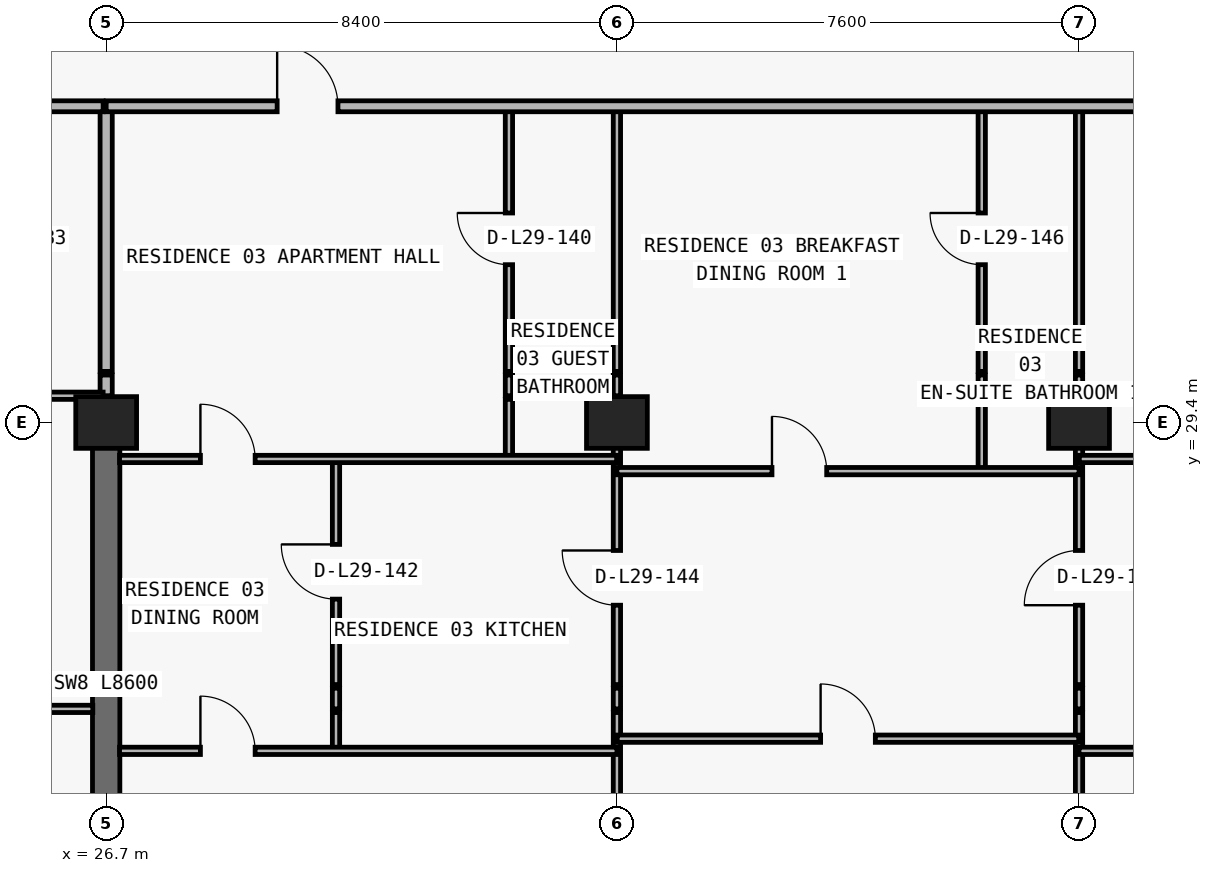
"""IFC4 building model, lengths in metres.
Left out: names, types, materials, properties, quantities, classifications, styles, units other than length and angle.
Written with IfcOpenShell. Run it as: python <this file> out.ifc"""

import sys

from ifc_helpers import new_model, si_unit, direction, frame, frame_2d, origin, origin_2d, place, context, subcontext, project, spatial, rectangle, extrude, element, fill, save


model = new_model("IFC4")
c1 = context("Model", 3, precision=1e-05, world=origin(), true_north=direction((0.0, 1.0)))
c2 = subcontext(c1, "Body", "Model", "MODEL_VIEW")
j1 = project(units=[si_unit("LENGTHUNIT", "METRE"), si_unit("PLANEANGLEUNIT", "RADIAN")], contexts=[c1])
p1 = place(None, origin())
s1 = spatial("IfcSite", under=j1, at=p1, CompositionType="ELEMENT")
p2 = place(p1, origin())
s2 = spatial("IfcBuilding", under=s1, at=p2, CompositionType="ELEMENT")
p3 = place(p2, frame((0.0, 0.0, 109.2)))
s3 = spatial("IfcBuildingStorey", under=s2, at=p3, CompositionType="ELEMENT", Elevation=109.2)
for number, where, z_axis, x_axis in (
    (1, (26.7, 29.4, 0.0), (0.0, 0.0, 1.0), (1.0, 0.0, 0.0)),
    (2, (35.1, 29.4, 0.0), (0.0, 0.0, 1.0), (1.0, 0.0, 0.0)),
    (3, (42.7, 29.4, 0.0), (0.0, 0.0, 1.0), (1.0, 0.0, 0.0)),
):
    element("IfcColumn", number, at=place(p3, frame(where, z_axis=z_axis, x_axis=x_axis)), inside=s3, PredefinedType="COLUMN", context=c2, shape_type="SweptSolid", body=[
        extrude(rectangle(XDim=1.0, YDim=0.85, at=origin_2d()), origin(), (0.0, 0.0, 1.0), 3.05),
    ])
p4 = place(p3, frame((26.7, 20.8, 0.0), z_axis=(0.0, 0.0, 1.0), x_axis=(0.0, 1.0, 0.0)))
e4 = element("IfcWall", 4, at=p4, inside=s3, PredefinedType="SHEAR", context=c2, shape_type="SweptSolid", body=[
    extrude(rectangle(XDim=8.6, YDim=0.45, at=frame_2d((4.3, 0.0))), origin(), (0.0, 0.0, 1.0), 3.05),
])
p5 = place(p3, frame((26.7, 29.405, 0.0), z_axis=(0.0, 0.0, 1.0), x_axis=(0.0, 1.0, 0.0)))
e5 = element("IfcWall", 5, at=p5, inside=s3, PredefinedType="PARTITIONING", context=c2, shape_type="SweptSolid", body=[
    extrude(rectangle(XDim=0.375, YDim=0.2, at=frame_2d((0.188, 0.0))), origin(), (0.0, 0.0, 1.0), 3.05),
])
p6 = place(p3, frame((26.7, 29.84, 0.0), z_axis=(0.0, 0.0, 1.0), x_axis=(0.0, 1.0, 0.0)))
e6 = element("IfcWall", 6, at=p6, inside=s3, PredefinedType="PARTITIONING", context=c2, shape_type="SweptSolid", body=[
    extrude(rectangle(XDim=0.34, YDim=0.2, at=frame_2d((0.17, 0.0))), origin(), (0.0, 0.0, 1.0), 2.335),
])
p7 = place(p3, frame((26.7, 30.24, 0.0), z_axis=(0.0, 0.0, 1.0), x_axis=(0.0, 1.0, 0.0)))
e7 = element("IfcWall", 7, at=p7, inside=s3, PredefinedType="PARTITIONING", context=c2, shape_type="SweptSolid", body=[
    extrude(rectangle(XDim=4.36, YDim=0.2, at=frame_2d((2.18, 0.0))), origin(), (0.0, 0.0, 1.0), 2.335),
])
p8 = place(p3, frame((30.48, 24.0, 0.0), z_axis=(0.0, 0.0, 1.0), x_axis=(0.0, 1.0, 0.0)))
e8 = element("IfcWall", 8, at=p8, inside=s3, PredefinedType="PARTITIONING", context=c2, shape_type="SweptSolid", body=[
    extrude(rectangle(XDim=0.63, YDim=0.12, at=frame_2d((0.315, 0.0))), origin(), (0.0, 0.0, 1.0), 3.05),
])
p9 = place(p3, frame((30.48, 24.69, 0.0), z_axis=(0.0, 0.0, 1.0), x_axis=(0.0, 1.0, 0.0)))
e9 = element("IfcWall", 9, at=p9, inside=s3, PredefinedType="PARTITIONING", context=c2, shape_type="SweptSolid", body=[
    extrude(rectangle(XDim=0.34, YDim=0.12, at=frame_2d((0.17, 0.0))), origin(), (0.0, 0.0, 1.0), 3.05),
])
p10 = place(p3, frame((30.48, 25.09, 0.0), z_axis=(0.0, 0.0, 1.0), x_axis=(0.0, 1.0, 0.0)))
e10 = element("IfcWall", 10, at=p10, inside=s3, PredefinedType="PARTITIONING", context=c2, shape_type="SweptSolid", body=[
    extrude(rectangle(XDim=3.71, YDim=0.12, at=frame_2d((1.855, 0.0))), origin(), (0.0, 0.0, 1.0), 3.05),
])
p11 = place(p10, frame((1.405, 0.0, 0.0)))
e11 = element("IfcOpeningElement", 11, at=p11, cuts=e10, PredefinedType="OPENING", context=c2, shape_type="SweptSolid", body=[
    extrude(rectangle(XDim=0.9, YDim=2.15, at=frame_2d((0.45, 1.075))), frame((0.0, 0.07, 0.0), z_axis=(0.0, -1.0, 0.0), x_axis=(1.0, 0.0, 0.0)), (0.0, 0.0, 1.0), 0.14),
])
p12 = place(p3, frame((33.324, 28.8, 0.0), z_axis=(0.0, 0.0, 1.0), x_axis=(0.0, 1.0, 0.0)))
e12 = element("IfcWall", 12, at=p12, inside=s3, PredefinedType="PARTITIONING", context=c2, shape_type="SweptSolid", body=[
    extrude(rectangle(XDim=0.98, YDim=0.12, at=frame_2d((0.49, 0.0))), origin(), (0.0, 0.0, 1.0), 3.05),
])
p13 = place(p3, frame((33.324, 29.84, 0.0), z_axis=(0.0, 0.0, 1.0), x_axis=(0.0, 1.0, 0.0)))
e13 = element("IfcWall", 13, at=p13, inside=s3, PredefinedType="PARTITIONING", context=c2, shape_type="SweptSolid", body=[
    extrude(rectangle(XDim=0.34, YDim=0.12, at=frame_2d((0.17, 0.0))), origin(), (0.0, 0.0, 1.0), 3.05),
])
p14 = place(p3, frame((33.324, 30.24, 0.0), z_axis=(0.0, 0.0, 1.0), x_axis=(0.0, 1.0, 0.0)))
e14 = element("IfcWall", 14, at=p14, inside=s3, PredefinedType="PARTITIONING", context=c2, shape_type="SweptSolid", body=[
    extrude(rectangle(XDim=4.36, YDim=0.12, at=frame_2d((2.18, 0.0))), origin(), (0.0, 0.0, 1.0), 3.05),
])
p15 = place(p14, frame((1.755, 0.0, 0.0)))
e15 = element("IfcOpeningElement", 15, at=p15, cuts=e14, PredefinedType="OPENING", context=c2, shape_type="SweptSolid", body=[
    extrude(rectangle(XDim=0.85, YDim=2.1, at=frame_2d((0.425, 1.05))), frame((0.0, 0.07, 0.0), z_axis=(0.0, -1.0, 0.0), x_axis=(1.0, 0.0, 0.0)), (0.0, 0.0, 1.0), 0.14),
])
p16 = place(p3, frame((35.1, 8.84, 0.0), z_axis=(0.0, 0.0, 1.0), x_axis=(0.0, 1.0, 0.0)))
e16 = element("IfcWall", 16, at=p16, inside=s3, PredefinedType="PARTITIONING", context=c2, shape_type="SweptSolid", body=[
    extrude(rectangle(XDim=15.79, YDim=0.12, at=frame_2d((7.895, 0.0))), origin(), (0.0, 0.0, 1.0), 2.174),
])
p17 = place(p3, frame((35.1, 24.69, 0.0), z_axis=(0.0, 0.0, 1.0), x_axis=(0.0, 1.0, 0.0)))
e17 = element("IfcWall", 17, at=p17, inside=s3, PredefinedType="PARTITIONING", context=c2, shape_type="SweptSolid", body=[
    extrude(rectangle(XDim=0.34, YDim=0.12, at=frame_2d((0.17, 0.0))), origin(), (0.0, 0.0, 1.0), 2.174),
])
p18 = place(p3, frame((35.1, 25.09, 0.0), z_axis=(0.0, 0.0, 1.0), x_axis=(0.0, 1.0, 0.0)))
e18 = element("IfcWall", 18, at=p18, inside=s3, PredefinedType="PARTITIONING", context=c2, shape_type="SweptSolid", body=[
    extrude(rectangle(XDim=4.69, YDim=0.12, at=frame_2d((2.345, 0.0))), origin(), (0.0, 0.0, 1.0), 2.174),
])
p19 = place(p18, frame((1.305, 0.0, 0.0)))
e19 = element("IfcOpeningElement", 19, at=p19, cuts=e18, PredefinedType="OPENING", context=c2, shape_type="SweptSolid", body=[
    extrude(rectangle(XDim=0.9, YDim=2.124, at=frame_2d((0.45, 1.062))), frame((0.0, 0.07, 0.0), z_axis=(0.0, -1.0, 0.0), x_axis=(1.0, 0.0, 0.0)), (0.0, 0.0, 1.0), 0.14),
])
p20 = place(p3, frame((35.1, 29.84, 0.0), z_axis=(0.0, 0.0, 1.0), x_axis=(0.0, 1.0, 0.0)))
e20 = element("IfcWall", 20, at=p20, inside=s3, PredefinedType="PARTITIONING", context=c2, shape_type="SweptSolid", body=[
    extrude(rectangle(XDim=0.34, YDim=0.12, at=frame_2d((0.17, 0.0))), origin(), (0.0, 0.0, 1.0), 2.174),
])
p21 = place(p3, frame((35.1, 30.24, 0.0), z_axis=(0.0, 0.0, 1.0), x_axis=(0.0, 1.0, 0.0)))
e21 = element("IfcWall", 21, at=p21, inside=s3, PredefinedType="PARTITIONING", context=c2, shape_type="SweptSolid", body=[
    extrude(rectangle(XDim=4.36, YDim=0.12, at=frame_2d((2.18, 0.0))), origin(), (0.0, 0.0, 1.0), 2.174),
])
p22 = place(p3, frame((41.1, 28.6, 0.0), z_axis=(0.0, 0.0, 1.0), x_axis=(0.0, 1.0, 0.0)))
e22 = element("IfcWall", 22, at=p22, inside=s3, PredefinedType="PARTITIONING", context=c2, shape_type="SweptSolid", body=[
    extrude(rectangle(XDim=1.18, YDim=0.12, at=frame_2d((0.59, 0.0))), origin(), (0.0, 0.0, 1.0), 2.679),
])
p23 = place(p3, frame((41.1, 29.84, 0.0), z_axis=(0.0, 0.0, 1.0), x_axis=(0.0, 1.0, 0.0)))
e23 = element("IfcWall", 23, at=p23, inside=s3, PredefinedType="PARTITIONING", context=c2, shape_type="SweptSolid", body=[
    extrude(rectangle(XDim=0.34, YDim=0.12, at=frame_2d((0.17, 0.0))), origin(), (0.0, 0.0, 1.0), 3.05),
])
p24 = place(p3, frame((41.1, 30.24, 0.0), z_axis=(0.0, 0.0, 1.0), x_axis=(0.0, 1.0, 0.0)))
e24 = element("IfcWall", 24, at=p24, inside=s3, PredefinedType="PARTITIONING", context=c2, shape_type="SweptSolid", body=[
    extrude(rectangle(XDim=4.36, YDim=0.12, at=frame_2d((2.18, 0.0))), origin(), (0.0, 0.0, 1.0), 3.05),
])
p25 = place(p24, frame((1.755, 0.0, 0.0)))
e25 = element("IfcOpeningElement", 25, at=p25, cuts=e24, PredefinedType="OPENING", context=c2, shape_type="SweptSolid", body=[
    extrude(rectangle(XDim=0.85, YDim=2.1, at=frame_2d((0.425, 1.05))), frame((0.0, 0.07, 0.0), z_axis=(0.0, -1.0, 0.0), x_axis=(1.0, 0.0, 0.0)), (0.0, 0.0, 1.0), 0.14),
])
p26 = place(p3, frame((42.7, 8.84, 0.0), z_axis=(0.0, 0.0, 1.0), x_axis=(0.0, 1.0, 0.0)))
e26 = element("IfcWall", 26, at=p26, inside=s3, PredefinedType="PARTITIONING", context=c2, shape_type="SweptSolid", body=[
    extrude(rectangle(XDim=15.79, YDim=0.12, at=frame_2d((7.895, 0.0))), origin(), (0.0, 0.0, 1.0), 2.174),
])
p27 = place(p3, frame((42.7, 24.69, 0.0), z_axis=(0.0, 0.0, 1.0), x_axis=(0.0, 1.0, 0.0)))
e27 = element("IfcWall", 27, at=p27, inside=s3, PredefinedType="PARTITIONING", context=c2, shape_type="SweptSolid", body=[
    extrude(rectangle(XDim=0.34, YDim=0.12, at=frame_2d((0.17, 0.0))), origin(), (0.0, 0.0, 1.0), 2.174),
])
p28 = place(p3, frame((42.7, 25.09, 0.0), z_axis=(0.0, 0.0, 1.0), x_axis=(0.0, 1.0, 0.0)))
e28 = element("IfcWall", 28, at=p28, inside=s3, PredefinedType="PARTITIONING", context=c2, shape_type="SweptSolid", body=[
    extrude(rectangle(XDim=4.69, YDim=0.12, at=frame_2d((2.345, 0.0))), origin(), (0.0, 0.0, 1.0), 2.174),
])
p29 = place(p28, frame((1.305, 0.0, 0.0)))
e29 = element("IfcOpeningElement", 29, at=p29, cuts=e28, PredefinedType="OPENING", context=c2, shape_type="SweptSolid", body=[
    extrude(rectangle(XDim=0.9, YDim=2.124, at=frame_2d((0.45, 1.062))), frame((0.0, 0.07, 0.0), z_axis=(0.0, -1.0, 0.0), x_axis=(1.0, 0.0, 0.0)), (0.0, 0.0, 1.0), 0.14),
])
p30 = place(p3, frame((42.7, 29.84, 0.0), z_axis=(0.0, 0.0, 1.0), x_axis=(0.0, 1.0, 0.0)))
e30 = element("IfcWall", 30, at=p30, inside=s3, PredefinedType="PARTITIONING", context=c2, shape_type="SweptSolid", body=[
    extrude(rectangle(XDim=0.34, YDim=0.12, at=frame_2d((0.17, 0.0))), origin(), (0.0, 0.0, 1.0), 2.174),
])
p31 = place(p3, frame((42.7, 30.24, 0.0), z_axis=(0.0, 0.0, 1.0), x_axis=(0.0, 1.0, 0.0)))
e31 = element("IfcWall", 31, at=p31, inside=s3, PredefinedType="PARTITIONING", context=c2, shape_type="SweptSolid", body=[
    extrude(rectangle(XDim=4.36, YDim=0.12, at=frame_2d((2.18, 0.0))), origin(), (0.0, 0.0, 1.0), 2.174),
])
p32 = place(p3, frame((26.92, 24.0, 0.0), z_axis=(0.0, 0.0, 1.0), x_axis=(1.0, 0.0, 0.0)))
e32 = element("IfcWall", 32, at=p32, inside=s3, PredefinedType="PARTITIONING", context=c2, shape_type="SweptSolid", body=[
    extrude(rectangle(XDim=8.18, YDim=0.12, at=frame_2d((4.09, 0.0))), origin(), (0.0, 0.0, 1.0), 3.05),
])
p33 = place(p32, frame((1.33, 0.0, 0.0)))
e33 = element("IfcOpeningElement", 33, at=p33, cuts=e32, PredefinedType="OPENING", context=c2, shape_type="SweptSolid", body=[
    extrude(rectangle(XDim=0.9, YDim=2.15, at=frame_2d((0.45, 1.075))), frame((0.0, 0.07, 0.0), z_axis=(0.0, -1.0, 0.0), x_axis=(1.0, 0.0, 0.0)), (0.0, 0.0, 1.0), 0.14),
])
p34 = place(p3, frame((42.7, 24.0, 0.0), z_axis=(0.0, 0.0, 1.0), x_axis=(1.0, 0.0, 0.0)))
e34 = element("IfcWall", 34, at=p34, inside=s3, PredefinedType="PARTITIONING", context=c2, shape_type="SweptSolid", body=[
    extrude(rectangle(XDim=8.18, YDim=0.12, at=frame_2d((4.09, 0.0))), origin(), (0.0, 0.0, 1.0), 3.05),
])
p35 = place(p34, frame((3.64, 0.0, 0.0)))
e35 = element("IfcOpeningElement", 35, at=p35, cuts=e34, PredefinedType="OPENING", context=c2, shape_type="SweptSolid", body=[
    extrude(rectangle(XDim=0.9, YDim=2.15, at=frame_2d((0.45, 1.075))), frame((0.0, 0.07, 0.0), z_axis=(0.0, -1.0, 0.0), x_axis=(1.0, 0.0, 0.0)), (0.0, 0.0, 1.0), 0.14),
])
p36 = place(p3, frame((35.105, 24.2, 0.0), z_axis=(0.0, 0.0, 1.0), x_axis=(1.0, 0.0, 0.0)))
e36 = element("IfcWall", 36, at=p36, inside=s3, PredefinedType="PARTITIONING", context=c2, shape_type="SweptSolid", body=[
    extrude(rectangle(XDim=7.59, YDim=0.12, at=frame_2d((3.795, 0.0))), origin(), (0.0, 0.0, 1.0), 3.05),
])
p37 = place(p36, frame((3.345, 0.0, 0.0)))
e37 = element("IfcOpeningElement", 37, at=p37, cuts=e36, PredefinedType="OPENING", context=c2, shape_type="SweptSolid", body=[
    extrude(rectangle(XDim=0.9, YDim=2.15, at=frame_2d((0.45, 1.075))), frame((0.0, 0.07, 0.0), z_axis=(0.0, -1.0, 0.0), x_axis=(1.0, 0.0, 0.0)), (0.0, 0.0, 1.0), 0.14),
])
p38 = place(p3, frame((18.3, 24.69, 0.0), z_axis=(0.0, 0.0, 1.0), x_axis=(1.0, 0.0, 0.0)))
e38 = element("IfcWall", 38, at=p38, inside=s3, PredefinedType="PARTITIONING", context=c2, shape_type="SweptSolid", body=[
    extrude(rectangle(XDim=8.18, YDim=0.12, at=frame_2d((4.09, 0.0))), origin(), (0.0, 0.0, 1.0), 3.05),
])
p39 = place(p38, frame((1.818, 0.0, 0.0)))
e39 = element("IfcOpeningElement", 39, at=p39, cuts=e38, PredefinedType="OPENING", context=c2, shape_type="SweptSolid", body=[
    extrude(rectangle(XDim=0.9, YDim=2.15, at=frame_2d((0.45, 1.075))), frame((0.0, 0.07, 0.0), z_axis=(0.0, -1.0, 0.0), x_axis=(1.0, 0.0, 0.0)), (0.0, 0.0, 1.0), 0.14),
])
p40 = place(p38, frame((5.95, 0.0, 0.0)))
e40 = element("IfcOpeningElement", 40, at=p40, cuts=e38, PredefinedType="OPENING", context=c2, shape_type="SweptSolid", body=[
    extrude(rectangle(XDim=0.9, YDim=2.15, at=frame_2d((0.45, 1.075))), frame((0.0, 0.07, 0.0), z_axis=(0.0, -1.0, 0.0), x_axis=(1.0, 0.0, 0.0)), (0.0, 0.0, 1.0), 0.14),
])
p41 = place(p3, frame((35.1, 28.6, 0.0), z_axis=(0.0, 0.0, 1.0), x_axis=(1.0, 0.0, 0.0)))
e41 = element("IfcWall", 41, at=p41, inside=s3, PredefinedType="PARTITIONING", context=c2, shape_type="SweptSolid", body=[
    extrude(rectangle(XDim=7.6, YDim=0.12, at=frame_2d((3.8, 0.0))), origin(), (0.0, 0.0, 1.0), 3.05),
])
p42 = place(p41, frame((2.55, 0.0, 0.0)))
e42 = element("IfcOpeningElement", 42, at=p42, cuts=e41, PredefinedType="OPENING", context=c2, shape_type="SweptSolid", body=[
    extrude(rectangle(XDim=0.9, YDim=2.15, at=frame_2d((0.45, 1.075))), frame((0.0, 0.07, 0.0), z_axis=(0.0, -1.0, 0.0), x_axis=(1.0, 0.0, 0.0)), (0.0, 0.0, 1.0), 0.14),
])
p43 = place(p3, frame((26.92, 28.8, 0.0), z_axis=(0.0, 0.0, 1.0), x_axis=(1.0, 0.0, 0.0)))
e43 = element("IfcWall", 43, at=p43, inside=s3, PredefinedType="PARTITIONING", context=c2, shape_type="SweptSolid", body=[
    extrude(rectangle(XDim=8.175, YDim=0.12, at=frame_2d((4.087, 0.0))), origin(), (0.0, 0.0, 1.0), 3.05),
])
p44 = place(p43, frame((1.33, 0.0, 0.0)))
e44 = element("IfcOpeningElement", 44, at=p44, cuts=e43, PredefinedType="OPENING", context=c2, shape_type="SweptSolid", body=[
    extrude(rectangle(XDim=0.9, YDim=2.15, at=frame_2d((0.45, 1.075))), frame((0.0, 0.07, 0.0), z_axis=(0.0, -1.0, 0.0), x_axis=(1.0, 0.0, 0.0)), (0.0, 0.0, 1.0), 0.14),
])
p45 = place(p3, frame((42.705, 28.8, 0.0), z_axis=(0.0, 0.0, 1.0), x_axis=(1.0, 0.0, 0.0)))
e45 = element("IfcWall", 45, at=p45, inside=s3, PredefinedType="PARTITIONING", context=c2, shape_type="SweptSolid", body=[
    extrude(rectangle(XDim=8.175, YDim=0.12, at=frame_2d((4.087, 0.0))), origin(), (0.0, 0.0, 1.0), 3.05),
])
p46 = place(p45, frame((2.877, 0.0, 0.0)))
e46 = element("IfcOpeningElement", 46, at=p46, cuts=e45, PredefinedType="OPENING", context=c2, shape_type="SweptSolid", body=[
    extrude(rectangle(XDim=0.9, YDim=2.15, at=frame_2d((0.45, 1.075))), frame((0.0, 0.07, 0.0), z_axis=(0.0, -1.0, 0.0), x_axis=(1.0, 0.0, 0.0)), (0.0, 0.0, 1.0), 0.14),
])
p47 = place(p3, frame((18.3, 29.84, 0.0), z_axis=(0.0, 0.0, 1.0), x_axis=(1.0, 0.0, 0.0)))
e47 = element("IfcWall", 47, at=p47, inside=s3, PredefinedType="PARTITIONING", context=c2, shape_type="SweptSolid", body=[
    extrude(rectangle(XDim=8.35, YDim=0.12, at=frame_2d((4.175, 0.0))), origin(), (0.0, 0.0, 1.0), 3.05),
])
p48 = place(p47, frame((1.818, 0.0, 0.0)))
e48 = element("IfcOpeningElement", 48, at=p48, cuts=e47, PredefinedType="OPENING", context=c2, shape_type="SweptSolid", body=[
    extrude(rectangle(XDim=0.9, YDim=2.15, at=frame_2d((0.45, 1.075))), frame((0.0, 0.07, 0.0), z_axis=(0.0, -1.0, 0.0), x_axis=(1.0, 0.0, 0.0)), (0.0, 0.0, 1.0), 0.14),
])
p49 = place(p3, frame((18.3, 34.6, 0.0), z_axis=(0.0, 0.0, 1.0), x_axis=(1.0, 0.0, 0.0)))
e49 = element("IfcWall", 49, at=p49, inside=s3, PredefinedType="PARTITIONING", context=c2, shape_type="SweptSolid", body=[
    extrude(rectangle(XDim=8.35, YDim=0.18, at=frame_2d((4.175, 0.0))), origin(), (0.0, 0.0, 1.0), 3.05),
])
p50 = place(p49, frame((2.691, 0.0, 0.0)))
e50 = element("IfcOpeningElement", 50, at=p50, cuts=e49, PredefinedType="OPENING", context=c2, shape_type="SweptSolid", body=[
    extrude(rectangle(XDim=1.0, YDim=2.2, at=frame_2d((0.5, 1.1))), frame((0.0, 0.1, 0.0), z_axis=(0.0, -1.0, 0.0), x_axis=(1.0, 0.0, 0.0)), (0.0, 0.0, 1.0), 0.2),
])
p51 = place(p3, frame((26.7, 34.6, 0.0), z_axis=(0.0, 0.0, 1.0), x_axis=(1.0, 0.0, 0.0)))
e51 = element("IfcWall", 51, at=p51, inside=s3, PredefinedType="PARTITIONING", context=c2, shape_type="SweptSolid", body=[
    extrude(rectangle(XDim=32.8, YDim=0.18, at=frame_2d((16.4, 0.0))), origin(), (0.0, 0.0, 1.0), 3.05),
])
p52 = place(p51, frame((2.812, 0.0, 0.0)))
e52 = element("IfcOpeningElement", 52, at=p52, cuts=e51, PredefinedType="OPENING", context=c2, shape_type="SweptSolid", body=[
    extrude(rectangle(XDim=1.0, YDim=2.2, at=frame_2d((0.5, 1.1))), frame((0.0, 0.1, 0.0), z_axis=(0.0, -1.0, 0.0), x_axis=(1.0, 0.0, 0.0)), (0.0, 0.0, 1.0), 0.2),
])
p53 = place(p51, frame((27.104, 0.0, 0.0)))
e53 = element("IfcOpeningElement", 53, at=p53, cuts=e51, PredefinedType="OPENING", context=c2, shape_type="SweptSolid", body=[
    extrude(rectangle(XDim=1.0, YDim=2.2, at=frame_2d((0.5, 1.1))), frame((0.0, 0.1, 0.0), z_axis=(0.0, -1.0, 0.0), x_axis=(1.0, 0.0, 0.0)), (0.0, 0.0, 1.0), 0.2),
])
p54 = place(p52, origin())
e54 = element("IfcDoor", 54, at=p54, inside=s3, OperationType="SINGLE_SWING_LEFT", PredefinedType="DOOR", context=c2, shape_type="SweptSolid", body=[
    extrude(rectangle(XDim=1.0, YDim=2.2, at=frame_2d((0.5, 1.1))), frame((0.0, 0.025, 0.0), z_axis=(0.0, -1.0, 0.0), x_axis=(1.0, 0.0, 0.0)), (0.0, 0.0, 1.0), 0.05),
])
fill(e52, e54)
p55 = place(p15, origin())
e55 = element("IfcDoor", 55, at=p55, inside=s3, OperationType="SINGLE_SWING_RIGHT", PredefinedType="DOOR", context=c2, shape_type="SweptSolid", body=[
    extrude(rectangle(XDim=0.85, YDim=2.1, at=frame_2d((0.425, 1.05))), frame((0.0, 0.025, 0.0), z_axis=(0.0, -1.0, 0.0), x_axis=(1.0, 0.0, 0.0)), (0.0, 0.0, 1.0), 0.05),
])
fill(e15, e55)
p56 = place(p44, origin())
e56 = element("IfcDoor", 56, at=p56, inside=s3, OperationType="SINGLE_SWING_LEFT", PredefinedType="DOOR", context=c2, shape_type="SweptSolid", body=[
    extrude(rectangle(XDim=0.9, YDim=2.15, at=frame_2d((0.45, 1.075))), frame((0.0, 0.025, 0.0), z_axis=(0.0, -1.0, 0.0), x_axis=(1.0, 0.0, 0.0)), (0.0, 0.0, 1.0), 0.05),
])
fill(e44, e56)
p57 = place(p11, origin())
e57 = element("IfcDoor", 57, at=p57, inside=s3, OperationType="SINGLE_SWING_RIGHT", PredefinedType="DOOR", context=c2, shape_type="SweptSolid", body=[
    extrude(rectangle(XDim=0.9, YDim=2.15, at=frame_2d((0.45, 1.075))), frame((0.0, 0.025, 0.0), z_axis=(0.0, -1.0, 0.0), x_axis=(1.0, 0.0, 0.0)), (0.0, 0.0, 1.0), 0.05),
])
fill(e11, e57)
p58 = place(p33, origin())
e58 = element("IfcDoor", 58, at=p58, inside=s3, OperationType="SINGLE_SWING_LEFT", PredefinedType="DOOR", context=c2, shape_type="SweptSolid", body=[
    extrude(rectangle(XDim=0.9, YDim=2.15, at=frame_2d((0.45, 1.075))), frame((0.0, 0.025, 0.0), z_axis=(0.0, -1.0, 0.0), x_axis=(1.0, 0.0, 0.0)), (0.0, 0.0, 1.0), 0.05),
])
fill(e33, e58)
p59 = place(p19, origin())
e59 = element("IfcDoor", 59, at=p59, inside=s3, OperationType="SINGLE_SWING_RIGHT", PredefinedType="DOOR", context=c2, shape_type="SweptSolid", body=[
    extrude(rectangle(XDim=0.9, YDim=2.124, at=frame_2d((0.45, 1.062))), frame((0.0, 0.025, 0.0), z_axis=(0.0, -1.0, 0.0), x_axis=(1.0, 0.0, 0.0)), (0.0, 0.0, 1.0), 0.05),
])
fill(e19, e59)
p60 = place(p42, origin())
e60 = element("IfcDoor", 60, at=p60, inside=s3, OperationType="SINGLE_SWING_LEFT", PredefinedType="DOOR", context=c2, shape_type="SweptSolid", body=[
    extrude(rectangle(XDim=0.9, YDim=2.15, at=frame_2d((0.45, 1.075))), frame((0.0, 0.025, 0.0), z_axis=(0.0, -1.0, 0.0), x_axis=(1.0, 0.0, 0.0)), (0.0, 0.0, 1.0), 0.05),
])
fill(e42, e60)
p61 = place(p25, origin())
e61 = element("IfcDoor", 61, at=p61, inside=s3, OperationType="SINGLE_SWING_RIGHT", PredefinedType="DOOR", context=c2, shape_type="SweptSolid", body=[
    extrude(rectangle(XDim=0.85, YDim=2.1, at=frame_2d((0.425, 1.05))), frame((0.0, 0.025, 0.0), z_axis=(0.0, -1.0, 0.0), x_axis=(1.0, 0.0, 0.0)), (0.0, 0.0, 1.0), 0.05),
])
fill(e25, e61)
p62 = place(p37, origin())
e62 = element("IfcDoor", 62, at=p62, inside=s3, OperationType="SINGLE_SWING_LEFT", PredefinedType="DOOR", context=c2, shape_type="SweptSolid", body=[
    extrude(rectangle(XDim=0.9, YDim=2.15, at=frame_2d((0.45, 1.075))), frame((0.0, 0.025, 0.0), z_axis=(0.0, -1.0, 0.0), x_axis=(1.0, 0.0, 0.0)), (0.0, 0.0, 1.0), 0.05),
])
fill(e37, e62)
p63 = place(p29, origin())
e63 = element("IfcDoor", 63, at=p63, inside=s3, OperationType="SINGLE_SWING_LEFT", PredefinedType="DOOR", context=c2, shape_type="SweptSolid", body=[
    extrude(rectangle(XDim=0.9, YDim=2.124, at=frame_2d((0.45, 1.062))), frame((0.0, 0.025, 0.0), z_axis=(0.0, -1.0, 0.0), x_axis=(1.0, 0.0, 0.0)), (0.0, 0.0, 1.0), 0.05),
])
fill(e29, e63)
save(model, sys.argv[1])
